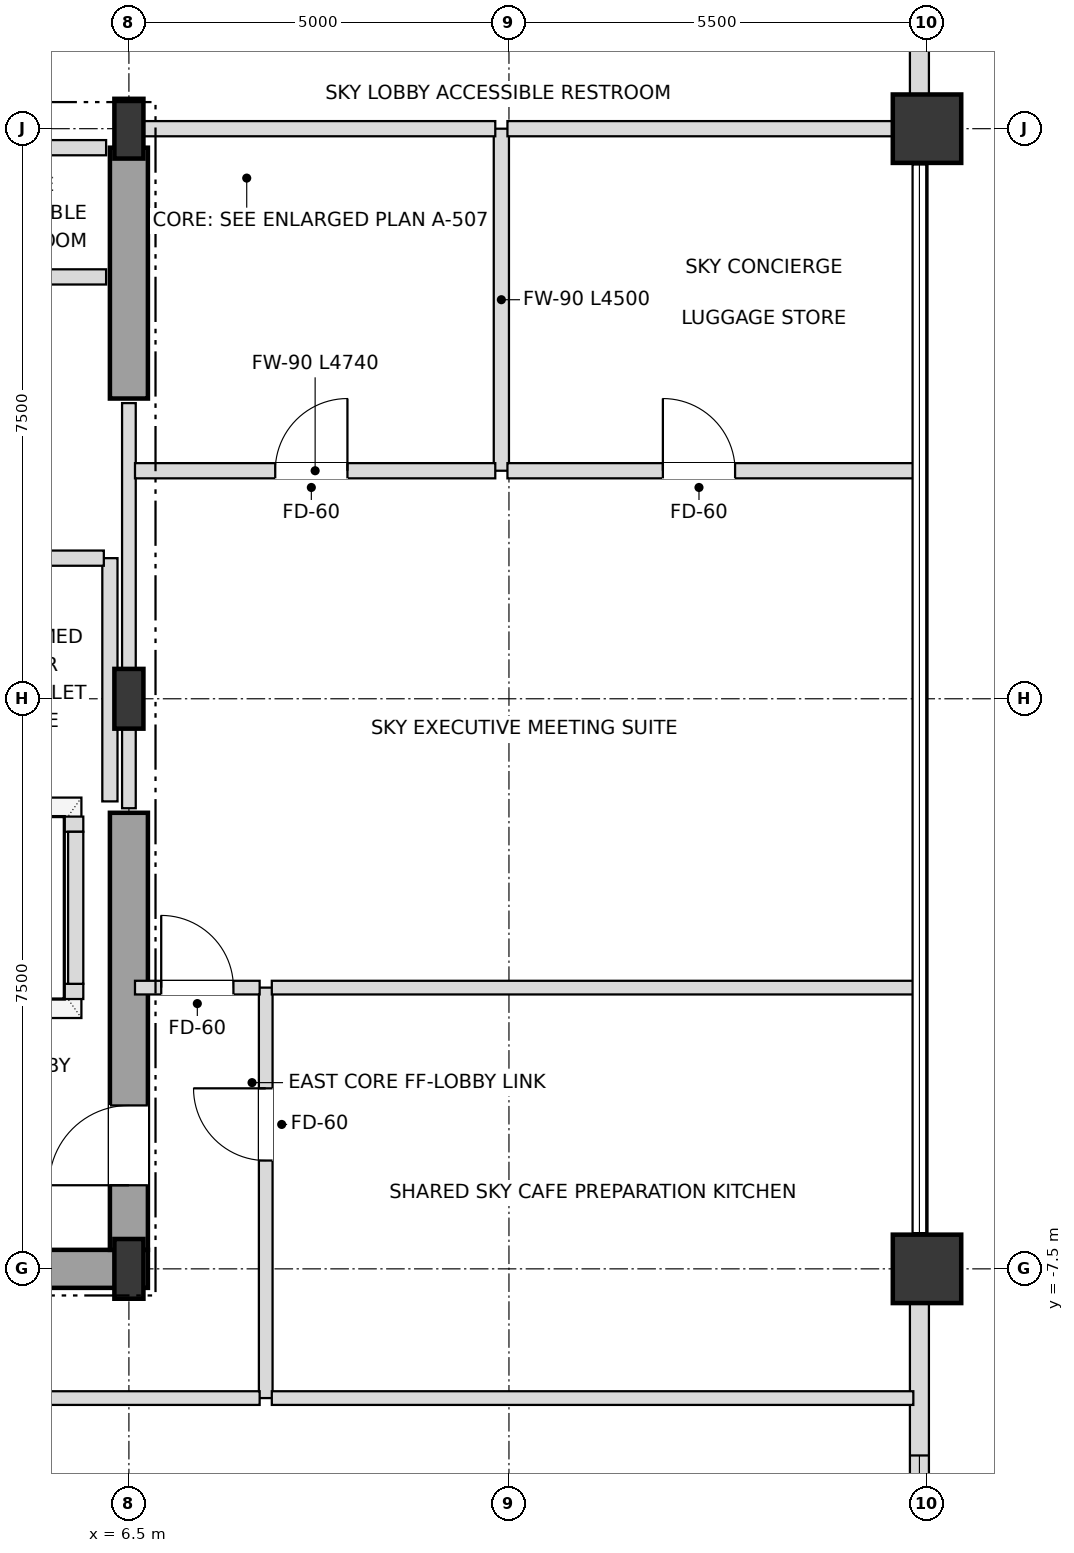
"""IFC4 building model, lengths in metres.
Left out: names, types, materials, properties, quantities, classifications, styles, units other than length and angle.
Written with IfcOpenShell. Run it as: python <this file> out.ifc"""

import sys

from ifc_helpers import new_model, si_unit, direction, frame, frame_2d, origin, origin_2d, place, context, subcontext, project, spatial, rectangle, i_section, extrude, element, fill, save


model = new_model("IFC4")
c1 = context("Model", 3, precision=1e-05, world=origin(), true_north=direction((0.0, 1.0)))
c2 = subcontext(c1, "Body", "Model", "MODEL_VIEW")
j1 = project(units=[si_unit("LENGTHUNIT", "METRE"), si_unit("PLANEANGLEUNIT", "RADIAN")], contexts=[c1])
p1 = place(None, origin())
s1 = spatial("IfcSite", under=j1, at=p1, CompositionType="ELEMENT")
p2 = place(p1, origin())
s2 = spatial("IfcBuilding", under=s1, at=p2, CompositionType="ELEMENT")
p3 = place(p2, frame((0.0, 0.0, 222.3)))
s3 = spatial("IfcBuildingStorey", under=s2, at=p3, CompositionType="ELEMENT", Elevation=222.3)
for number, where, z_axis, x_axis in (
    (1, (6.5, -7.5, 0.0), (0.0, 0.0, 1.0), (1.0, 0.0, 0.0)),
    (2, (6.5, 0.0, 0.0), (0.0, 0.0, 1.0), (1.0, 0.0, 0.0)),
    (3, (6.5, 7.5, 0.0), (0.0, 0.0, 1.0), (1.0, 0.0, 0.0)),
):
    element("IfcColumn", number, at=place(p3, frame(where, z_axis=z_axis, x_axis=x_axis)), inside=s3, PredefinedType="COLUMN", context=c2, shape_type="SweptSolid", body=[
        extrude(i_section(OverallWidth=0.382, OverallDepth=0.786, WebThickness=0.02, FlangeThickness=0.033, at=origin_2d()), origin(), (0.0, 0.0, 1.0), 3.6),
    ])
for number, where, z_axis, x_axis in (
    (4, (17.0, -7.5, 0.0), (0.0, 0.0, 1.0), (1.0, 0.0, 0.0)),
    (5, (17.0, 7.5, 0.0), (0.0, 0.0, 1.0), (1.0, 0.0, 0.0)),
):
    element("IfcColumn", number, at=place(p3, frame(where, z_axis=z_axis, x_axis=x_axis)), inside=s3, PredefinedType="USERDEFINED", context=c2, shape_type="SweptSolid", body=[
        extrude(rectangle(XDim=0.9, YDim=0.9, at=origin_2d()), origin(), (0.0, 0.0, 1.0), 3.6),
    ])
p4 = place(p3, frame((16.9, -12.555, 0.0), z_axis=(0.0, 0.0, 1.0), x_axis=(0.0, 1.0, 0.0)))
e6 = element("IfcWall", 6, at=p4, inside=s3, PredefinedType="SOLIDWALL", context=c2, shape_type="SweptSolid", body=[
    extrude(rectangle(XDim=4.61, YDim=0.25, at=frame_2d((2.305, 0.0))), origin(), (0.0, 0.0, 1.0), 2.748),
])
p5 = place(p4, frame((0.8, 0.0, 0.72)))
e7 = element("IfcOpeningElement", 7, at=p5, cuts=e6, PredefinedType="OPENING", context=c2, shape_type="SweptSolid", body=[
    extrude(rectangle(XDim=1.8, YDim=1.68, at=frame_2d((0.9, 0.84))), frame((0.0, 0.135, 0.0), z_axis=(0.0, -1.0, 0.0), x_axis=(1.0, 0.0, 0.0)), (0.0, 0.0, 1.0), 0.27),
])
p6 = place(p3, frame((16.9, 7.945, 0.0), z_axis=(0.0, 0.0, 1.0), x_axis=(0.0, 1.0, 0.0)))
e8 = element("IfcWall", 8, at=p6, inside=s3, PredefinedType="SOLIDWALL", context=c2, shape_type="SweptSolid", body=[
    extrude(rectangle(XDim=4.61, YDim=0.25, at=frame_2d((2.305, 0.0))), origin(), (0.0, 0.0, 1.0), 2.748),
])
p7 = place(p6, frame((1.405, 0.0, 0.72)))
e9 = element("IfcOpeningElement", 9, at=p7, cuts=e8, PredefinedType="OPENING", context=c2, shape_type="SweptSolid", body=[
    extrude(rectangle(XDim=1.8, YDim=1.68, at=frame_2d((0.9, 0.84))), frame((0.0, 0.135, 0.0), z_axis=(0.0, -1.0, 0.0), x_axis=(1.0, 0.0, 0.0)), (0.0, 0.0, 1.0), 0.27),
])
p8 = place(p3, frame((0.0, -7.5, 0.0), z_axis=(0.0, 0.0, 1.0), x_axis=(1.0, 0.0, 0.0)))
e10 = element("IfcWall", 10, at=p8, inside=s3, PredefinedType="SHEAR", context=c2, shape_type="SweptSolid", body=[
    extrude(rectangle(XDim=6.75, YDim=0.5, at=frame_2d((3.375, 0.0))), origin(), (0.0, 0.0, 1.0), 3.38),
])
p9 = place(p3, frame((6.5, -7.25, 0.0), z_axis=(0.0, 0.0, 1.0), x_axis=(0.0, 1.0, 0.0)))
e11 = element("IfcWall", 11, at=p9, inside=s3, PredefinedType="SHEAR", context=c2, shape_type="SweptSolid", body=[
    extrude(rectangle(XDim=5.75, YDim=0.5, at=frame_2d((2.875, 0.0))), origin(), (0.0, 0.0, 1.0), 3.38),
])
p10 = place(p9, frame((0.85, 0.0, 0.0)))
e12 = element("IfcOpeningElement", 12, at=p10, cuts=e11, PredefinedType="OPENING", context=c2, shape_type="SweptSolid", body=[
    extrude(rectangle(XDim=1.05, YDim=2.15, at=frame_2d((0.525, 1.075))), frame((0.0, 0.26, 0.0), z_axis=(0.0, -1.0, 0.0), x_axis=(1.0, 0.0, 0.0)), (0.0, 0.0, 1.0), 0.52),
])
p11 = place(p3, frame((6.5, 3.95, 0.0), z_axis=(0.0, 0.0, 1.0), x_axis=(0.0, 1.0, 0.0)))
e13 = element("IfcWall", 13, at=p11, inside=s3, PredefinedType="SHEAR", context=c2, shape_type="SweptSolid", body=[
    extrude(rectangle(XDim=3.3, YDim=0.5, at=frame_2d((1.65, 0.0))), origin(), (0.0, 0.0, 1.0), 3.38),
])
p12 = place(p3, frame((1.8, -3.85, 0.0), z_axis=(0.0, 0.0, 1.0), x_axis=(1.0, 0.0, 0.0)))
e14 = element("IfcWall", 14, at=p12, inside=s3, PredefinedType="SOLIDWALL", context=c2, shape_type="SweptSolid", body=[
    extrude(rectangle(XDim=4.1, YDim=0.2, at=frame_2d((2.05, 0.0))), origin(), (0.0, 0.0, 1.0), 3.38),
])
p13 = place(p12, frame((0.45, 0.0, 0.0)))
e15 = element("IfcOpeningElement", 15, at=p13, cuts=e14, PredefinedType="OPENING", context=c2, shape_type="SweptSolid", body=[
    extrude(rectangle(XDim=1.2, YDim=2.2, at=frame_2d((0.6, 1.1))), frame((0.0, 0.11, 0.0), z_axis=(0.0, -1.0, 0.0), x_axis=(1.0, 0.0, 0.0)), (0.0, 0.0, 1.0), 0.22),
])
p14 = place(p12, frame((2.45, 0.0, 0.0)))
e16 = element("IfcOpeningElement", 16, at=p14, cuts=e14, PredefinedType="OPENING", context=c2, shape_type="SweptSolid", body=[
    extrude(rectangle(XDim=1.2, YDim=2.2, at=frame_2d((0.6, 1.1))), frame((0.0, 0.11, 0.0), z_axis=(0.0, -1.0, 0.0), x_axis=(1.0, 0.0, 0.0)), (0.0, 0.0, 1.0), 0.22),
])
p15 = place(p3, frame((1.8, -1.65, 0.0), z_axis=(0.0, 0.0, 1.0), x_axis=(1.0, 0.0, 0.0)))
e17 = element("IfcWall", 17, at=p15, inside=s3, PredefinedType="SOLIDWALL", context=c2, shape_type="SweptSolid", body=[
    extrude(rectangle(XDim=4.1, YDim=0.2, at=frame_2d((2.05, 0.0))), origin(), (0.0, 0.0, 1.0), 3.38),
])
p16 = place(p3, frame((5.8, -3.75, 0.0), z_axis=(0.0, 0.0, 1.0), x_axis=(0.0, 1.0, 0.0)))
e18 = element("IfcWall", 18, at=p16, inside=s3, PredefinedType="SOLIDWALL", context=c2, shape_type="SweptSolid", body=[
    extrude(rectangle(XDim=2.0, YDim=0.2, at=frame_2d((1.0, 0.0))), origin(), (0.0, 0.0, 1.0), 3.38),
])
p17 = place(p3, frame((6.25, -1.35, 0.0), z_axis=(0.0, 0.0, 1.0), x_axis=(0.0, 1.0, 0.0)))
e19 = element("IfcWall", 19, at=p17, inside=s3, PredefinedType="SOLIDWALL", context=c2, shape_type="SweptSolid", body=[
    extrude(rectangle(XDim=3.2, YDim=0.2, at=frame_2d((1.6, 0.0))), origin(), (0.0, 0.0, 1.0), 3.38),
])
p18 = place(p3, frame((6.5, -1.44, 0.0), z_axis=(0.0, 0.0, 1.0), x_axis=(0.0, 1.0, 0.0)))
e20 = element("IfcWall", 20, at=p18, inside=s3, PredefinedType="PARTITIONING", context=c2, shape_type="SweptSolid", body=[
    extrude(rectangle(XDim=5.33, YDim=0.18, at=frame_2d((2.665, 0.0))), origin(), (0.0, 0.0, 1.0), 2.826),
])
p19 = place(p3, frame((8.3, -9.2, 0.0), z_axis=(0.0, 0.0, 1.0), x_axis=(0.0, 1.0, 0.0)))
e21 = element("IfcWall", 21, at=p19, inside=s3, PredefinedType="PARTITIONING", context=c2, shape_type="SweptSolid", body=[
    extrude(rectangle(XDim=5.4, YDim=0.18, at=frame_2d((2.7, 0.0))), origin(), (0.0, 0.0, 1.0), 2.826),
])
p20 = place(p19, frame((3.125, 0.0, 0.0)))
e22 = element("IfcOpeningElement", 22, at=p20, cuts=e21, PredefinedType="OPENING", context=c2, shape_type="SweptSolid", body=[
    extrude(rectangle(XDim=0.95, YDim=2.15, at=frame_2d((0.475, 1.075))), frame((0.0, 0.1, 0.0), z_axis=(0.0, -1.0, 0.0), x_axis=(1.0, 0.0, 0.0)), (0.0, 0.0, 1.0), 0.2),
])
p21 = place(p3, frame((11.4, 3.0, 0.0), z_axis=(0.0, 0.0, 1.0), x_axis=(0.0, 1.0, 0.0)))
e23 = element("IfcWall", 23, at=p21, inside=s3, PredefinedType="SOLIDWALL", context=c2, shape_type="SweptSolid", body=[
    extrude(rectangle(XDim=4.5, YDim=0.2, at=frame_2d((2.25, 0.0))), origin(), (0.0, 0.0, 1.0), 3.018),
])
p22 = place(p3, frame((0.08, -9.2, 0.0), z_axis=(0.0, 0.0, 1.0), x_axis=(1.0, 0.0, 0.0)))
e24 = element("IfcWall", 24, at=p22, inside=s3, PredefinedType="PARTITIONING", context=c2, shape_type="SweptSolid", body=[
    extrude(rectangle(XDim=8.14, YDim=0.18, at=frame_2d((4.07, 0.0))), origin(), (0.0, 0.0, 1.0), 2.826),
])
p23 = place(p22, frame((3.445, 0.0, 0.0)))
e25 = element("IfcOpeningElement", 25, at=p23, cuts=e24, PredefinedType="OPENING", context=c2, shape_type="SweptSolid", body=[
    extrude(rectangle(XDim=0.95, YDim=2.15, at=frame_2d((0.475, 1.075))), frame((0.0, 0.1, 0.0), z_axis=(0.0, -1.0, 0.0), x_axis=(1.0, 0.0, 0.0)), (0.0, 0.0, 1.0), 0.2),
])
p24 = place(p3, frame((8.38, -9.2, 0.0), z_axis=(0.0, 0.0, 1.0), x_axis=(1.0, 0.0, 0.0)))
e26 = element("IfcWall", 26, at=p24, inside=s3, PredefinedType="PARTITIONING", context=c2, shape_type="SweptSolid", body=[
    extrude(rectangle(XDim=8.44, YDim=0.18, at=frame_2d((4.22, 0.0))), origin(), (0.0, 0.0, 1.0), 3.38),
])
p25 = place(p3, frame((6.58, -3.8, 0.0), z_axis=(0.0, 0.0, 1.0), x_axis=(1.0, 0.0, 0.0)))
e27 = element("IfcWall", 27, at=p25, inside=s3, PredefinedType="PARTITIONING", context=c2, shape_type="SweptSolid", body=[
    extrude(rectangle(XDim=1.64, YDim=0.18, at=frame_2d((0.82, 0.0))), origin(), (0.0, 0.0, 1.0), 3.38),
])
p26 = place(p25, frame((0.345, 0.0, 0.0)))
e28 = element("IfcOpeningElement", 28, at=p26, cuts=e27, PredefinedType="OPENING", context=c2, shape_type="SweptSolid", body=[
    extrude(rectangle(XDim=0.95, YDim=2.15, at=frame_2d((0.475, 1.075))), frame((0.0, 0.1, 0.0), z_axis=(0.0, -1.0, 0.0), x_axis=(1.0, 0.0, 0.0)), (0.0, 0.0, 1.0), 0.2),
])
p27 = place(p3, frame((8.38, -3.8, 0.0), z_axis=(0.0, 0.0, 1.0), x_axis=(1.0, 0.0, 0.0)))
e29 = element("IfcWall", 29, at=p27, inside=s3, PredefinedType="PARTITIONING", context=c2, shape_type="SweptSolid", body=[
    extrude(rectangle(XDim=8.44, YDim=0.18, at=frame_2d((4.22, 0.0))), origin(), (0.0, 0.0, 1.0), 3.018),
])
p28 = place(p3, frame((4.13, 1.85, 0.0), z_axis=(0.0, 0.0, 1.0), x_axis=(1.0, 0.0, 0.0)))
e30 = element("IfcWall", 30, at=p28, inside=s3, PredefinedType="SOLIDWALL", context=c2, shape_type="SweptSolid", body=[
    extrude(rectangle(XDim=2.04, YDim=0.2, at=frame_2d((1.02, 0.0))), origin(), (0.0, 0.0, 1.0), 3.38),
])
p29 = place(p3, frame((6.58, 3.0, 0.0), z_axis=(0.0, 0.0, 1.0), x_axis=(1.0, 0.0, 0.0)))
e31 = element("IfcWall", 31, at=p29, inside=s3, PredefinedType="SOLIDWALL", context=c2, shape_type="SweptSolid", body=[
    extrude(rectangle(XDim=4.74, YDim=0.2, at=frame_2d((2.37, 0.0))), origin(), (0.0, 0.0, 1.0), 3.38),
])
p30 = place(p29, frame((1.845, 0.0, 0.0)))
e32 = element("IfcOpeningElement", 32, at=p30, cuts=e31, PredefinedType="OPENING", context=c2, shape_type="SweptSolid", body=[
    extrude(rectangle(XDim=0.95, YDim=2.15, at=frame_2d((0.475, 1.075))), frame((0.0, 0.11, 0.0), z_axis=(0.0, -1.0, 0.0), x_axis=(1.0, 0.0, 0.0)), (0.0, 0.0, 1.0), 0.22),
])
p31 = place(p3, frame((11.48, 3.0, 0.0), z_axis=(0.0, 0.0, 1.0), x_axis=(1.0, 0.0, 0.0)))
e33 = element("IfcWall", 33, at=p31, inside=s3, PredefinedType="SOLIDWALL", context=c2, shape_type="SweptSolid", body=[
    extrude(rectangle(XDim=5.34, YDim=0.2, at=frame_2d((2.67, 0.0))), origin(), (0.0, 0.0, 1.0), 3.38),
])
p32 = place(p31, frame((2.045, 0.0, 0.0)))
e34 = element("IfcOpeningElement", 34, at=p32, cuts=e33, PredefinedType="OPENING", context=c2, shape_type="SweptSolid", body=[
    extrude(rectangle(XDim=0.95, YDim=2.15, at=frame_2d((0.475, 1.075))), frame((0.0, 0.11, 0.0), z_axis=(0.0, -1.0, 0.0), x_axis=(1.0, 0.0, 0.0)), (0.0, 0.0, 1.0), 0.22),
])
for number, where, z_axis, x_axis in (
    (35, (4.13, 5.55, 0.0), (0.0, 0.0, 1.0), (1.0, 0.0, 0.0)),
    (36, (4.13, 7.25, 0.0), (0.0, 0.0, 1.0), (1.0, 0.0, 0.0)),
):
    element("IfcWall", number, at=place(p3, frame(where, z_axis=z_axis, x_axis=x_axis)), inside=s3, PredefinedType="SOLIDWALL", context=c2, shape_type="SweptSolid", body=[
        extrude(rectangle(XDim=2.07, YDim=0.2, at=frame_2d((1.035, 0.0))), origin(), (0.0, 0.0, 1.0), 3.38),
    ])
p33 = place(p3, frame((6.5, 7.5, 0.0), z_axis=(0.0, 0.0, 1.0), x_axis=(1.0, 0.0, 0.0)))
e37 = element("IfcWall", 37, at=p33, inside=s3, PredefinedType="SOLIDWALL", context=c2, shape_type="SweptSolid", body=[
    extrude(rectangle(XDim=4.82, YDim=0.2, at=frame_2d((2.41, 0.0))), origin(), (0.0, 0.0, 1.0), 2.826),
])
p34 = place(p3, frame((11.48, 7.5, 0.0), z_axis=(0.0, 0.0, 1.0), x_axis=(1.0, 0.0, 0.0)))
e38 = element("IfcWall", 38, at=p34, inside=s3, PredefinedType="SOLIDWALL", context=c2, shape_type="SweptSolid", body=[
    extrude(rectangle(XDim=5.42, YDim=0.2, at=frame_2d((2.71, 0.0))), origin(), (0.0, 0.0, 1.0), 2.826),
])
p35 = place(p5, origin())
e39 = element("IfcWindow", 39, at=p35, inside=s3, PartitioningType="SINGLE_PANEL", PredefinedType="WINDOW", context=c2, shape_type="SweptSolid", body=[
    extrude(rectangle(XDim=1.8, YDim=1.68, at=frame_2d((0.9, 0.84))), frame((0.0, 0.03, 0.0), z_axis=(0.0, -1.0, 0.0), x_axis=(1.0, 0.0, 0.0)), (0.0, 0.0, 1.0), 0.06),
])
fill(e7, e39)
p36 = place(p10, origin())
e40 = element("IfcDoor", 40, at=p36, inside=s3, OperationType="SINGLE_SWING_LEFT", PredefinedType="DOOR", context=c2, shape_type="SweptSolid", body=[
    extrude(rectangle(XDim=1.05, YDim=2.15, at=frame_2d((0.525, 1.075))), frame((0.0, 0.025, 0.0), z_axis=(0.0, -1.0, 0.0), x_axis=(1.0, 0.0, 0.0)), (0.0, 0.0, 1.0), 0.05),
])
fill(e12, e40)
p37 = place(p20, origin())
e41 = element("IfcDoor", 41, at=p37, inside=s3, OperationType="SINGLE_SWING_RIGHT", PredefinedType="DOOR", context=c2, shape_type="SweptSolid", body=[
    extrude(rectangle(XDim=0.95, YDim=2.15, at=frame_2d((0.475, 1.075))), frame((0.0, 0.025, 0.0), z_axis=(0.0, -1.0, 0.0), x_axis=(1.0, 0.0, 0.0)), (0.0, 0.0, 1.0), 0.05),
])
fill(e22, e41)
p38 = place(p26, origin())
e42 = element("IfcDoor", 42, at=p38, inside=s3, OperationType="SINGLE_SWING_LEFT", PredefinedType="DOOR", context=c2, shape_type="SweptSolid", body=[
    extrude(rectangle(XDim=0.95, YDim=2.15, at=frame_2d((0.475, 1.075))), frame((0.0, 0.025, 0.0), z_axis=(0.0, -1.0, 0.0), x_axis=(1.0, 0.0, 0.0)), (0.0, 0.0, 1.0), 0.05),
])
fill(e28, e42)
p39 = place(p30, origin())
e43 = element("IfcDoor", 43, at=p39, inside=s3, OperationType="SINGLE_SWING_RIGHT", PredefinedType="DOOR", context=c2, shape_type="SweptSolid", body=[
    extrude(rectangle(XDim=0.95, YDim=2.15, at=frame_2d((0.475, 1.075))), frame((0.0, 0.025, 0.0), z_axis=(0.0, -1.0, 0.0), x_axis=(1.0, 0.0, 0.0)), (0.0, 0.0, 1.0), 0.05),
])
fill(e32, e43)
p40 = place(p32, origin())
e44 = element("IfcDoor", 44, at=p40, inside=s3, OperationType="SINGLE_SWING_LEFT", PredefinedType="DOOR", context=c2, shape_type="SweptSolid", body=[
    extrude(rectangle(XDim=0.95, YDim=2.15, at=frame_2d((0.475, 1.075))), frame((0.0, 0.025, 0.0), z_axis=(0.0, -1.0, 0.0), x_axis=(1.0, 0.0, 0.0)), (0.0, 0.0, 1.0), 0.05),
])
fill(e34, e44)
save(model, sys.argv[1])
